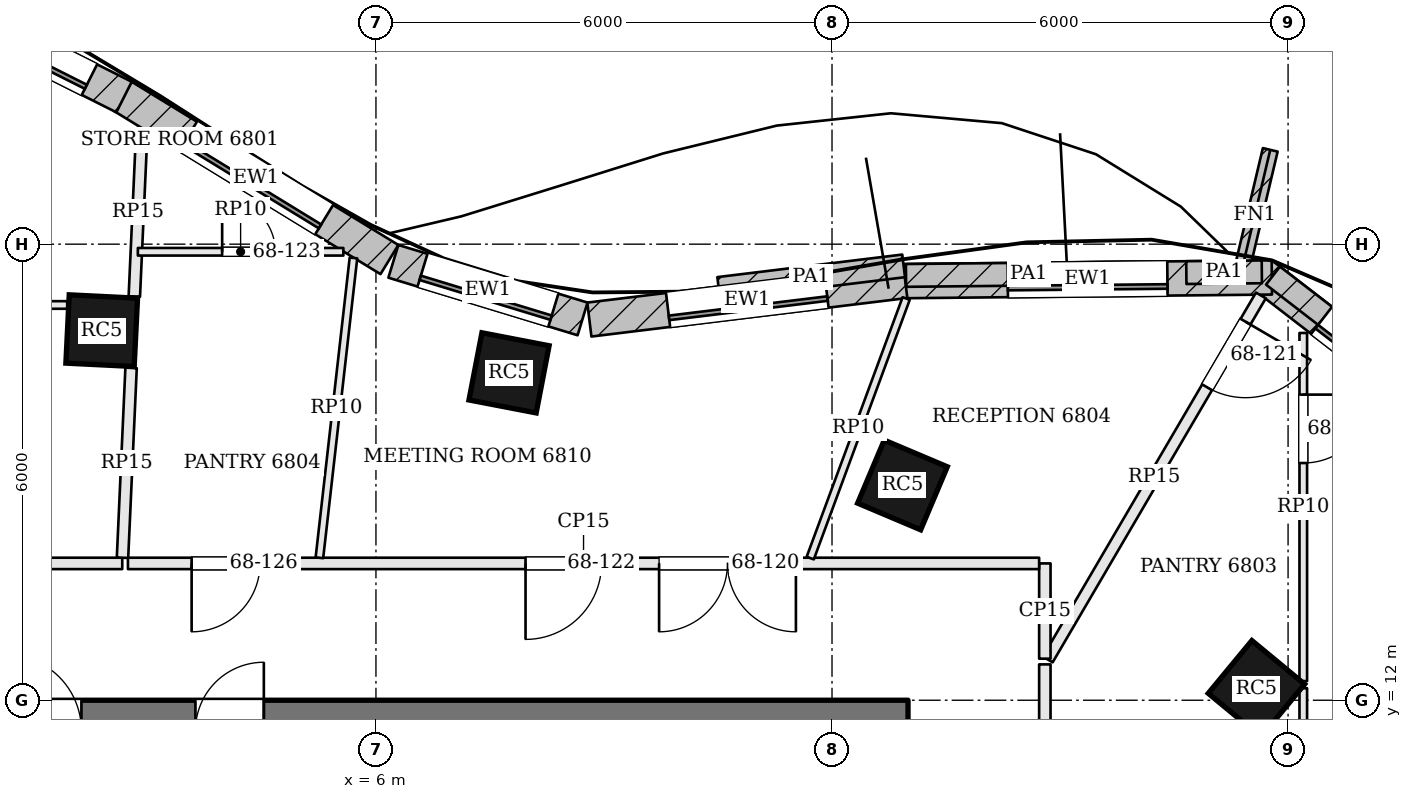
"""IFC4 building model, lengths in metres.
Left out: names, types, materials, properties, quantities, classifications, styles, units other than length and angle.
Written with IfcOpenShell. Run it as: python <this file> out.ifc"""

import sys

from ifc_helpers import new_model, si_unit, direction, frame, frame_2d, origin, origin_2d, place, context, subcontext, project, spatial, rectangle, extrude, element, fill, save


model = new_model("IFC4")
c1 = context("Model", 3, precision=1e-05, world=origin(), true_north=direction((0.0, 1.0)))
c2 = subcontext(c1, "Body", "Model", "MODEL_VIEW")
j1 = project(units=[si_unit("LENGTHUNIT", "METRE"), si_unit("PLANEANGLEUNIT", "RADIAN")], contexts=[c1])
p1 = place(None, origin())
s1 = spatial("IfcSite", under=j1, at=p1, CompositionType="ELEMENT")
p2 = place(p1, origin())
s2 = spatial("IfcBuilding", under=s1, at=p2, CompositionType="ELEMENT")
p3 = place(p2, frame((0.0, 0.0, 276.6)))
s3 = spatial("IfcBuildingStorey", under=s2, at=p3, CompositionType="ELEMENT", Elevation=276.6)
p4 = place(p3, frame((-13.0, 11.6, 0.0), z_axis=(0.0, 0.0, 1.0), x_axis=(1.0, 0.0, 0.0)))
e1 = element("IfcWall", 1, at=p4, inside=s3, PredefinedType="SHEAR", context=c2, shape_type="SweptSolid", body=[
    extrude(rectangle(XDim=26.0, YDim=0.8, at=frame_2d((13.0, 0.0))), origin(), (0.0, 0.0, 1.0), 3.9),
])
p5 = place(p4, frame((9.225, 0.0, 0.0)))
e2 = element("IfcOpeningElement", 2, at=p5, cuts=e1, PredefinedType="OPENING", context=c2, shape_type="SweptSolid", body=[
    extrude(rectangle(XDim=1.0, YDim=2.1, at=frame_2d((0.5, 1.05))), frame((0.0, 0.41, 0.0), z_axis=(0.0, -1.0, 0.0), x_axis=(1.0, 0.0, 0.0)), (0.0, 0.0, 1.0), 0.82),
])
p6 = place(p4, frame((11.825, 0.0, 0.0)))
e3 = element("IfcOpeningElement", 3, at=p6, cuts=e1, PredefinedType="OPENING", context=c2, shape_type="SweptSolid", body=[
    extrude(rectangle(XDim=0.7, YDim=2.1, at=frame_2d((0.35, 1.05))), frame((0.0, 0.41, 0.0), z_axis=(0.0, -1.0, 0.0), x_axis=(1.0, 0.0, 0.0)), (0.0, 0.0, 1.0), 0.82),
])
p7 = place(p4, frame((14.125, 0.0, 0.0)))
e4 = element("IfcOpeningElement", 4, at=p7, cuts=e1, PredefinedType="OPENING", context=c2, shape_type="SweptSolid", body=[
    extrude(rectangle(XDim=1.0, YDim=2.1, at=frame_2d((0.5, 1.05))), frame((0.0, 0.41, 0.0), z_axis=(0.0, -1.0, 0.0), x_axis=(1.0, 0.0, 0.0)), (0.0, 0.0, 1.0), 0.82),
])
p8 = place(p4, frame((16.625, 0.0, 0.0)))
e5 = element("IfcOpeningElement", 5, at=p8, cuts=e1, PredefinedType="OPENING", context=c2, shape_type="SweptSolid", body=[
    extrude(rectangle(XDim=0.9, YDim=2.1, at=frame_2d((0.45, 1.05))), frame((0.0, 0.41, 0.0), z_axis=(0.0, -1.0, 0.0), x_axis=(1.0, 0.0, 0.0)), (0.0, 0.0, 1.0), 0.82),
])
for number, where, z_axis, x_axis in (
    (6, (17.584, 12.151, 0.0), (0.0, 0.0, 1.0), (-0.771, 0.637, 0.0)),
    (7, (12.927, 14.832, 0.0), (0.0, 0.0, 1.0), (-0.921, 0.389, 0.0)),
    (8, (7.751, 16.307, 0.0), (0.0, 0.0, 1.0), (-0.982, 0.189, 0.0)),
    (9, (2.392, 16.862, 0.0), (0.0, 0.0, 1.0), (-0.999, 0.049, 0.0)),
):
    element("IfcColumn", number, at=place(p3, frame(where, z_axis=z_axis, x_axis=x_axis)), inside=s3, PredefinedType="COLUMN", context=c2, shape_type="SweptSolid", body=[
        extrude(rectangle(XDim=0.9, YDim=0.9, at=origin_2d()), origin(), (0.0, 0.0, 1.0), 3.9),
    ])
p9 = place(p3, frame((20.896, 15.104, 0.0), z_axis=(0.0, 0.0, 1.0), x_axis=(-0.791693388686, 0.610918634771, 0.0)))
e10 = element("IfcWall", 10, at=p9, inside=s3, PredefinedType="SOLIDWALL", context=c2, shape_type="SweptSolid", body=[
    extrude(rectangle(XDim=4.1, YDim=0.45, at=frame_2d((2.05, 0.0))), origin(), (0.0, 0.0, 1.0), 3.7),
])
p10 = place(p9, frame((1.0, 0.0, 0.9)))
e11 = element("IfcOpeningElement", 11, at=p10, cuts=e10, PredefinedType="OPENING", context=c2, shape_type="SweptSolid", body=[
    extrude(rectangle(XDim=2.1, YDim=2.3, at=frame_2d((1.05, 1.15))), frame((0.0, 0.235, 0.0), z_axis=(0.0, -1.0, 0.0), x_axis=(1.0, 0.0, 0.0)), (0.0, 0.0, 1.0), 0.47),
])
p11 = place(p3, frame((17.786, 17.562, 0.0), z_axis=(0.0, 0.0, 1.0), x_axis=(-0.999950280333, -0.00997180335, 0.0)))
e12 = element("IfcWall", 12, at=p11, inside=s3, PredefinedType="SOLIDWALL", context=c2, shape_type="SweptSolid", body=[
    extrude(rectangle(XDim=4.848, YDim=0.45, at=frame_2d((2.424, 0.0))), origin(), (0.0, 0.0, 1.0), 3.7),
])
p12 = place(p11, frame((1.374, 0.0, 0.9)))
e13 = element("IfcOpeningElement", 13, at=p12, cuts=e12, PredefinedType="OPENING", context=c2, shape_type="SweptSolid", body=[
    extrude(rectangle(XDim=2.1, YDim=2.3, at=frame_2d((1.05, 1.15))), frame((0.0, 0.235, 0.0), z_axis=(0.0, -1.0, 0.0), x_axis=(1.0, 0.0, 0.0)), (0.0, 0.0, 1.0), 0.47),
])
p13 = place(p3, frame((12.963, 17.515, 0.0), z_axis=(0.0, 0.0, 1.0), x_axis=(-0.992644852039, -0.121062784211, 0.0)))
e14 = element("IfcWall", 14, at=p13, inside=s3, PredefinedType="SOLIDWALL", context=c2, shape_type="SweptSolid", body=[
    extrude(rectangle(XDim=4.187, YDim=0.45, at=frame_2d((2.093, 0.0))), origin(), (0.0, 0.0, 1.0), 3.7),
])
p14 = place(p13, frame((1.043, 0.0, 0.9)))
e15 = element("IfcOpeningElement", 15, at=p14, cuts=e14, PredefinedType="OPENING", context=c2, shape_type="SweptSolid", body=[
    extrude(rectangle(XDim=2.1, YDim=2.3, at=frame_2d((1.05, 1.15))), frame((0.0, 0.235, 0.0), z_axis=(0.0, -1.0, 0.0), x_axis=(1.0, 0.0, 0.0)), (0.0, 0.0, 1.0), 0.47),
])
p15 = place(p3, frame((8.718, 17.017, 0.0), z_axis=(0.0, 0.0, 1.0), x_axis=(-0.956643192195, 0.291262429482, 0.0)))
e16 = element("IfcWall", 16, at=p15, inside=s3, PredefinedType="SOLIDWALL", context=c2, shape_type="SweptSolid", body=[
    extrude(rectangle(XDim=2.602, YDim=0.45, at=frame_2d((1.301, 0.0))), origin(), (0.0, 0.0, 1.0), 3.7),
])
p16 = place(p15, frame((0.401, 0.0, 0.9)))
e17 = element("IfcOpeningElement", 17, at=p16, cuts=e16, PredefinedType="OPENING", context=c2, shape_type="SweptSolid", body=[
    extrude(rectangle(XDim=1.8, YDim=2.3, at=frame_2d((0.9, 1.15))), frame((0.0, 0.235, 0.0), z_axis=(0.0, -1.0, 0.0), x_axis=(1.0, 0.0, 0.0)), (0.0, 0.0, 1.0), 0.47),
])
p17 = place(p3, frame((6.177, 17.798, 0.0), z_axis=(0.0, 0.0, 1.0), x_axis=(-0.852939764965, 0.52200934603, 0.0)))
e18 = element("IfcWall", 18, at=p17, inside=s3, PredefinedType="SOLIDWALL", context=c2, shape_type="SweptSolid", body=[
    extrude(rectangle(XDim=4.113, YDim=0.45, at=frame_2d((2.056, 0.0))), origin(), (0.0, 0.0, 1.0), 3.7),
])
p18 = place(p17, frame((1.006, 0.0, 0.9)))
e19 = element("IfcOpeningElement", 19, at=p18, cuts=e18, PredefinedType="OPENING", context=c2, shape_type="SweptSolid", body=[
    extrude(rectangle(XDim=2.1, YDim=2.3, at=frame_2d((1.05, 1.15))), frame((0.0, 0.235, 0.0), z_axis=(0.0, -1.0, 0.0), x_axis=(1.0, 0.0, 0.0)), (0.0, 0.0, 1.0), 0.47),
])
p19 = place(p3, frame((2.686, 19.936, 0.0), z_axis=(0.0, 0.0, 1.0), x_axis=(-0.893533051512, 0.448997422994, 0.0)))
e20 = element("IfcWall", 20, at=p19, inside=s3, PredefinedType="SOLIDWALL", context=c2, shape_type="SweptSolid", body=[
    extrude(rectangle(XDim=3.119, YDim=0.45, at=frame_2d((1.56, 0.0))), origin(), (0.0, 0.0, 1.0), 3.7),
])
p20 = place(p19, frame((0.51, 0.0, 0.9)))
e21 = element("IfcOpeningElement", 21, at=p20, cuts=e20, PredefinedType="OPENING", context=c2, shape_type="SweptSolid", body=[
    extrude(rectangle(XDim=2.1, YDim=2.3, at=frame_2d((1.05, 1.15))), frame((0.0, 0.235, 0.0), z_axis=(0.0, -1.0, 0.0), x_axis=(1.0, 0.0, 0.0)), (0.0, 0.0, 1.0), 0.47),
])
p21 = place(p3, frame((17.362, 17.538, 0.0), z_axis=(0.0, 0.0, 1.0), x_axis=(0.230469860183, 0.973079464148, 0.0)))
e22 = element("IfcWall", 22, at=p21, inside=s3, PredefinedType="SOLIDWALL", context=c2, shape_type="SweptSolid", body=[
    extrude(rectangle(XDim=1.75, YDim=0.2, at=frame_2d((0.875, 0.0))), origin(), (0.0, 0.0, 1.0), 3.7),
])
p22 = place(p3, frame((20.396, 15.584, 3.9), z_axis=(0.0, 0.0, 1.0), x_axis=(-0.791653544836, 0.610970265191, 0.0)))
e23 = element("IfcWall", 23, at=p22, inside=s3, PredefinedType="PARAPET", context=c2, shape_type="SweptSolid", body=[
    extrude(rectangle(XDim=3.277, YDim=0.3, at=frame_2d((1.638, 0.0))), origin(), (0.0, 0.0, 1.0), 1.1),
])
p23 = place(p3, frame((17.655, 17.636, 3.9), z_axis=(0.0, 0.0, 1.0), x_axis=(-0.999949189172, -0.010080628659, 0.0)))
e24 = element("IfcWall", 24, at=p23, inside=s3, PredefinedType="PARAPET", context=c2, shape_type="SweptSolid", body=[
    extrude(rectangle(XDim=0.993, YDim=0.3, at=frame_2d((0.497, 0.0))), origin(), (0.0, 0.0, 1.0), 1.1),
])
p24 = place(p3, frame((16.205, 17.621, 3.9), z_axis=(0.0, 0.0, 1.0), x_axis=(-0.999950267811, -0.009973058961, 0.0)))
e25 = element("IfcWall", 25, at=p24, inside=s3, PredefinedType="PARAPET", context=c2, shape_type="SweptSolid", body=[
    extrude(rectangle(XDim=3.231, YDim=0.3, at=frame_2d((1.616, 0.0))), origin(), (0.0, 0.0, 1.0), 1.1),
])
p25 = place(p3, frame((12.942, 17.714, 3.9), z_axis=(0.0, 0.0, 1.0), x_axis=(-0.992648796767, -0.121030435331, 0.0)))
e26 = element("IfcWall", 26, at=p25, inside=s3, PredefinedType="PARAPET", context=c2, shape_type="SweptSolid", body=[
    extrude(rectangle(XDim=2.451, YDim=0.3, at=frame_2d((1.226, 0.0))), origin(), (0.0, 0.0, 1.0), 1.1),
])
p26 = place(p3, frame((2.662, 13.8, 0.0), z_axis=(0.0, 0.0, 1.0), x_axis=(-1.0, 0.0, 0.0)))
e27 = element("IfcWall", 27, at=p26, inside=s3, PredefinedType="PARTITIONING", context=c2, shape_type="SweptSolid", body=[
    extrude(rectangle(XDim=17.462, YDim=0.15, at=frame_2d((8.731, 0.0))), origin(), (0.0, 0.0, 1.0), 3.198),
])
p27 = place(p26, frame((3.204, 0.0, 0.0)))
e28 = element("IfcOpeningElement", 28, at=p27, cuts=e27, PredefinedType="OPENING", context=c2, shape_type="SweptSolid", body=[
    extrude(rectangle(XDim=1.8, YDim=2.1, at=frame_2d((0.9, 1.05))), frame((0.0, 0.085, 0.0), z_axis=(0.0, -1.0, 0.0), x_axis=(1.0, 0.0, 0.0)), (0.0, 0.0, 1.0), 0.17),
])
p28 = place(p26, frame((8.997, 0.0, 0.0)))
e29 = element("IfcOpeningElement", 29, at=p28, cuts=e27, PredefinedType="OPENING", context=c2, shape_type="SweptSolid", body=[
    extrude(rectangle(XDim=1.0, YDim=2.4, at=frame_2d((0.5, 1.2))), frame((0.0, 0.085, 0.0), z_axis=(0.0, -1.0, 0.0), x_axis=(1.0, 0.0, 0.0)), (0.0, 0.0, 1.0), 0.17),
])
p29 = place(p26, frame((13.855, 0.0, 0.0)))
e30 = element("IfcOpeningElement", 30, at=p29, cuts=e27, PredefinedType="OPENING", context=c2, shape_type="SweptSolid", body=[
    extrude(rectangle(XDim=1.0, YDim=2.4, at=frame_2d((0.5, 1.2))), frame((0.0, 0.085, 0.0), z_axis=(0.0, -1.0, 0.0), x_axis=(1.0, 0.0, 0.0)), (0.0, 0.0, 1.0), 0.17),
])
p30 = place(p3, frame((2.921, 19.522, 0.0), z_axis=(0.0, 0.0, 1.0), x_axis=(-0.045122409645, -0.998981465368, 0.0)))
e31 = element("IfcWall", 31, at=p30, inside=s3, PredefinedType="PARTITIONING", context=c2, shape_type="SweptSolid", body=[
    extrude(rectangle(XDim=2.213, YDim=0.15, at=frame_2d((1.106, 0.0))), origin(), (0.0, 0.0, 1.0), 3.184),
])
p31 = place(p3, frame((2.779, 16.372, 0.0), z_axis=(0.0, 0.0, 1.0), x_axis=(-0.045217170266, -0.998977180677, 0.0)))
e32 = element("IfcWall", 32, at=p31, inside=s3, PredefinedType="PARTITIONING", context=c2, shape_type="SweptSolid", body=[
    extrude(rectangle(XDim=2.5, YDim=0.15, at=frame_2d((1.25, 0.0))), origin(), (0.0, 0.0, 1.0), 3.184),
])
p32 = place(p3, frame((14.8, -4.725, 0.0), z_axis=(0.0, 0.0, 1.0), x_axis=(0.0, 1.0, 0.0)))
e33 = element("IfcWall", 33, at=p32, inside=s3, PredefinedType="PARTITIONING", context=c2, shape_type="SweptSolid", body=[
    extrude(rectangle(XDim=17.197, YDim=0.15, at=frame_2d((8.598, 0.0))), origin(), (0.0, 0.0, 1.0), 3.198),
])
p33 = place(p32, frame((3.427, 0.0, 0.0)))
e34 = element("IfcOpeningElement", 34, at=p33, cuts=e33, PredefinedType="OPENING", context=c2, shape_type="SweptSolid", body=[
    extrude(rectangle(XDim=1.0, YDim=2.4, at=frame_2d((0.5, 1.2))), frame((0.0, 0.085, 0.0), z_axis=(0.0, -1.0, 0.0), x_axis=(1.0, 0.0, 0.0)), (0.0, 0.0, 1.0), 0.17),
])
p34 = place(p32, frame((9.431, 0.0, 0.0)))
e35 = element("IfcOpeningElement", 35, at=p34, cuts=e33, PredefinedType="OPENING", context=c2, shape_type="SweptSolid", body=[
    extrude(rectangle(XDim=1.0, YDim=2.4, at=frame_2d((0.5, 1.2))), frame((0.0, 0.085, 0.0), z_axis=(0.0, -1.0, 0.0), x_axis=(1.0, 0.0, 0.0)), (0.0, 0.0, 1.0), 0.17),
])
p35 = place(p3, frame((17.642, 17.325, 0.0), z_axis=(0.0, 0.0, 1.0), x_axis=(-0.505311858982, -0.862936802537, 0.0)))
e36 = element("IfcWall", 36, at=p35, inside=s3, PredefinedType="PARTITIONING", context=c2, shape_type="SweptSolid", body=[
    extrude(rectangle(XDim=5.55, YDim=0.15, at=frame_2d((2.775, 0.0))), origin(), (0.0, 0.0, 1.0), 3.184),
])
p36 = place(p35, frame((0.4, 0.0, 0.0)))
e37 = element("IfcOpeningElement", 37, at=p36, cuts=e36, PredefinedType="OPENING", context=c2, shape_type="SweptSolid", body=[
    extrude(rectangle(XDim=1.0, YDim=2.1, at=frame_2d((0.5, 1.05))), frame((0.0, 0.085, 0.0), z_axis=(0.0, -1.0, 0.0), x_axis=(1.0, 0.0, 0.0)), (0.0, 0.0, 1.0), 0.17),
])
p37 = place(p3, frame((14.8, 12.547, 0.0), z_axis=(0.0, 0.0, 1.0), x_axis=(0.0, 1.0, 0.0)))
e38 = element("IfcWall", 38, at=p37, inside=s3, PredefinedType="PARTITIONING", context=c2, shape_type="SweptSolid", body=[
    extrude(rectangle(XDim=1.253, YDim=0.15, at=frame_2d((0.627, 0.0))), origin(), (0.0, 0.0, 1.0), 3.198),
])
p38 = place(p3, frame((14.725, 13.8, 0.0), z_axis=(0.0, 0.0, 1.0), x_axis=(-1.0, 0.0, 0.0)))
e39 = element("IfcWall", 39, at=p38, inside=s3, PredefinedType="PARTITIONING", context=c2, shape_type="SweptSolid", body=[
    extrude(rectangle(XDim=11.988, YDim=0.15, at=frame_2d((5.994, 0.0))), origin(), (0.0, 0.0, 1.0), 3.198),
])
p39 = place(p38, frame((3.2, 0.0, 0.0)))
e40 = element("IfcOpeningElement", 40, at=p39, cuts=e39, PredefinedType="OPENING", context=c2, shape_type="SweptSolid", body=[
    extrude(rectangle(XDim=1.8, YDim=2.1, at=frame_2d((0.9, 1.05))), frame((0.0, 0.085, 0.0), z_axis=(0.0, -1.0, 0.0), x_axis=(1.0, 0.0, 0.0)), (0.0, 0.0, 1.0), 0.17),
])
p40 = place(p38, frame((5.757, 0.0, 0.0)))
e41 = element("IfcOpeningElement", 41, at=p40, cuts=e39, PredefinedType="OPENING", context=c2, shape_type="SweptSolid", body=[
    extrude(rectangle(XDim=1.0, YDim=2.4, at=frame_2d((0.5, 1.2))), frame((0.0, 0.085, 0.0), z_axis=(0.0, -1.0, 0.0), x_axis=(1.0, 0.0, 0.0)), (0.0, 0.0, 1.0), 0.17),
])
p41 = place(p38, frame((10.25, 0.0, 0.0)))
e42 = element("IfcOpeningElement", 42, at=p41, cuts=e39, PredefinedType="OPENING", context=c2, shape_type="SweptSolid", body=[
    extrude(rectangle(XDim=0.9, YDim=2.1, at=frame_2d((0.45, 1.05))), frame((0.0, 0.085, 0.0), z_axis=(0.0, -1.0, 0.0), x_axis=(1.0, 0.0, 0.0)), (0.0, 0.0, 1.0), 0.17),
])
p42 = place(p3, frame((-2.551, 17.2, 0.0), z_axis=(0.0, 0.0, 1.0), x_axis=(1.0, 0.0, 0.0)))
e43 = element("IfcWall", 43, at=p42, inside=s3, PredefinedType="PARTITIONING", context=c2, shape_type="SweptSolid", body=[
    extrude(rectangle(XDim=4.489, YDim=0.1, at=frame_2d((2.244, 0.0))), origin(), (0.0, 0.0, 1.0), 3.184),
])
p43 = place(p3, frame((18.2, 16.832, 0.0), z_axis=(0.0, 0.0, 1.0), x_axis=(0.0, -1.0, 0.0)))
e44 = element("IfcWall", 44, at=p43, inside=s3, PredefinedType="PARTITIONING", context=c2, shape_type="SweptSolid", body=[
    extrude(rectangle(XDim=4.58, YDim=0.1, at=frame_2d((2.29, 0.0))), origin(), (0.0, 0.0, 1.0), 3.184),
])
p44 = place(p43, frame((0.811, 0.0, 0.0)))
e45 = element("IfcOpeningElement", 45, at=p44, cuts=e44, PredefinedType="OPENING", context=c2, shape_type="SweptSolid", body=[
    extrude(rectangle(XDim=0.9, YDim=2.1, at=frame_2d((0.45, 1.05))), frame((0.0, 0.06, 0.0), z_axis=(0.0, -1.0, 0.0), x_axis=(1.0, 0.0, 0.0)), (0.0, 0.0, 1.0), 0.12),
])
p45 = place(p3, frame((18.2, 12.158, 0.0), z_axis=(0.0, 0.0, 1.0), x_axis=(0.0, -1.0, 0.0)))
e46 = element("IfcWall", 46, at=p45, inside=s3, PredefinedType="PARTITIONING", context=c2, shape_type="SweptSolid", body=[
    extrude(rectangle(XDim=20.358, YDim=0.1, at=frame_2d((10.179, 0.0))), origin(), (0.0, 0.0, 1.0), 3.184),
])
p46 = place(p3, frame((2.868, 17.9, 0.0), z_axis=(0.0, 0.0, 1.0), x_axis=(1.0, 0.0, 0.0)))
e47 = element("IfcWall", 47, at=p46, inside=s3, PredefinedType="PARTITIONING", context=c2, shape_type="SweptSolid", body=[
    extrude(rectangle(XDim=2.704, YDim=0.1, at=frame_2d((1.352, 0.0))), origin(), (0.0, 0.0, 1.0), 3.184),
])
p47 = place(p46, frame((1.109, 0.0, 0.0)))
e48 = element("IfcOpeningElement", 48, at=p47, cuts=e47, PredefinedType="OPENING", context=c2, shape_type="SweptSolid", body=[
    extrude(rectangle(XDim=0.7, YDim=2.1, at=frame_2d((0.35, 1.05))), frame((0.0, 0.06, 0.0), z_axis=(0.0, -1.0, 0.0), x_axis=(1.0, 0.0, 0.0)), (0.0, 0.0, 1.0), 0.12),
])
p48 = place(p3, frame((11.714, 13.87, 0.0), z_axis=(0.0, 0.0, 1.0), x_axis=(0.346665533997, 0.937988809922, 0.0)))
e49 = element("IfcWall", 49, at=p48, inside=s3, PredefinedType="PARTITIONING", context=c2, shape_type="SweptSolid", body=[
    extrude(rectangle(XDim=3.64, YDim=0.1, at=frame_2d((1.82, 0.0))), origin(), (0.0, 0.0, 1.0), 3.184),
])
p49 = place(p3, frame((5.256, 13.875, 0.0), z_axis=(0.0, 0.0, 1.0), x_axis=(0.11286138732, 0.993610742319, 0.0)))
e50 = element("IfcWall", 50, at=p49, inside=s3, PredefinedType="PARTITIONING", context=c2, shape_type="SweptSolid", body=[
    extrude(rectangle(XDim=3.969, YDim=0.1, at=frame_2d((1.985, 0.0))), origin(), (0.0, 0.0, 1.0), 3.184),
])
p50 = place(p10, origin())
e51 = element("IfcWindow", 51, at=p50, inside=s3, PartitioningType="SINGLE_PANEL", PredefinedType="WINDOW", context=c2, shape_type="SweptSolid", body=[
    extrude(rectangle(XDim=2.1, YDim=2.3, at=frame_2d((1.05, 1.15))), frame((0.0, 0.135, 0.0), z_axis=(0.0, -1.0, 0.0), x_axis=(1.0, 0.0, 0.0)), (0.0, 0.0, 1.0), 0.06),
])
fill(e11, e51)
p51 = place(p12, origin())
e52 = element("IfcWindow", 52, at=p51, inside=s3, PartitioningType="SINGLE_PANEL", PredefinedType="WINDOW", context=c2, shape_type="SweptSolid", body=[
    extrude(rectangle(XDim=2.1, YDim=2.3, at=frame_2d((1.05, 1.15))), frame((0.0, 0.135, 0.0), z_axis=(0.0, -1.0, 0.0), x_axis=(1.0, 0.0, 0.0)), (0.0, 0.0, 1.0), 0.06),
])
fill(e13, e52)
p52 = place(p14, origin())
e53 = element("IfcWindow", 53, at=p52, inside=s3, PartitioningType="SINGLE_PANEL", PredefinedType="WINDOW", context=c2, shape_type="SweptSolid", body=[
    extrude(rectangle(XDim=2.1, YDim=2.3, at=frame_2d((1.05, 1.15))), frame((0.0, 0.135, 0.0), z_axis=(0.0, -1.0, 0.0), x_axis=(1.0, 0.0, 0.0)), (0.0, 0.0, 1.0), 0.06),
])
fill(e15, e53)
p53 = place(p16, origin())
e54 = element("IfcWindow", 54, at=p53, inside=s3, PartitioningType="SINGLE_PANEL", PredefinedType="WINDOW", context=c2, shape_type="SweptSolid", body=[
    extrude(rectangle(XDim=1.8, YDim=2.3, at=frame_2d((0.9, 1.15))), frame((0.0, 0.135, 0.0), z_axis=(0.0, -1.0, 0.0), x_axis=(1.0, 0.0, 0.0)), (0.0, 0.0, 1.0), 0.06),
])
fill(e17, e54)
p54 = place(p18, origin())
e55 = element("IfcWindow", 55, at=p54, inside=s3, PartitioningType="SINGLE_PANEL", PredefinedType="WINDOW", context=c2, shape_type="SweptSolid", body=[
    extrude(rectangle(XDim=2.1, YDim=2.3, at=frame_2d((1.05, 1.15))), frame((0.0, 0.135, 0.0), z_axis=(0.0, -1.0, 0.0), x_axis=(1.0, 0.0, 0.0)), (0.0, 0.0, 1.0), 0.06),
])
fill(e19, e55)
p55 = place(p20, origin())
e56 = element("IfcWindow", 56, at=p55, inside=s3, PartitioningType="SINGLE_PANEL", PredefinedType="WINDOW", context=c2, shape_type="SweptSolid", body=[
    extrude(rectangle(XDim=2.1, YDim=2.3, at=frame_2d((1.05, 1.15))), frame((0.0, 0.135, 0.0), z_axis=(0.0, -1.0, 0.0), x_axis=(1.0, 0.0, 0.0)), (0.0, 0.0, 1.0), 0.06),
])
fill(e21, e56)
p56 = place(p44, origin())
e57 = element("IfcDoor", 57, at=p56, inside=s3, OperationType="SINGLE_SWING_LEFT", PredefinedType="DOOR", context=c2, shape_type="SweptSolid", body=[
    extrude(rectangle(XDim=0.9, YDim=2.1, at=frame_2d((0.45, 1.05))), frame((0.0, 0.025, 0.0), z_axis=(0.0, -1.0, 0.0), x_axis=(1.0, 0.0, 0.0)), (0.0, 0.0, 1.0), 0.05),
])
fill(e45, e57)
p57 = place(p39, origin())
e58 = element("IfcDoor", 58, at=p57, inside=s3, OperationType="DOUBLE_DOOR_SINGLE_SWING", PredefinedType="DOOR", context=c2, shape_type="SweptSolid", body=[
    extrude(rectangle(XDim=1.8, YDim=2.1, at=frame_2d((0.9, 1.05))), frame((0.0, 0.025, 0.0), z_axis=(0.0, -1.0, 0.0), x_axis=(1.0, 0.0, 0.0)), (0.0, 0.0, 1.0), 0.05),
])
fill(e40, e58)
p58 = place(p36, origin())
e59 = element("IfcDoor", 59, at=p58, inside=s3, OperationType="SINGLE_SWING_LEFT", PredefinedType="DOOR", context=c2, shape_type="SweptSolid", body=[
    extrude(rectangle(XDim=1.0, YDim=2.1, at=frame_2d((0.5, 1.05))), frame((0.0, 0.025, 0.0), z_axis=(0.0, -1.0, 0.0), x_axis=(1.0, 0.0, 0.0)), (0.0, 0.0, 1.0), 0.05),
])
fill(e37, e59)
p59 = place(p40, origin())
e60 = element("IfcDoor", 60, at=p59, inside=s3, OperationType="SINGLE_SWING_RIGHT", PredefinedType="DOOR", context=c2, shape_type="SweptSolid", body=[
    extrude(rectangle(XDim=1.0, YDim=2.4, at=frame_2d((0.5, 1.2))), frame((0.0, 0.025, 0.0), z_axis=(0.0, -1.0, 0.0), x_axis=(1.0, 0.0, 0.0)), (0.0, 0.0, 1.0), 0.05),
])
fill(e41, e60)
p60 = place(p47, origin())
e61 = element("IfcDoor", 61, at=p60, inside=s3, OperationType="SINGLE_SWING_LEFT", PredefinedType="DOOR", context=c2, shape_type="SweptSolid", body=[
    extrude(rectangle(XDim=0.7, YDim=2.1, at=frame_2d((0.35, 1.05))), frame((0.0, 0.025, 0.0), z_axis=(0.0, -1.0, 0.0), x_axis=(1.0, 0.0, 0.0)), (0.0, 0.0, 1.0), 0.05),
])
fill(e48, e61)
p61 = place(p41, origin())
e62 = element("IfcDoor", 62, at=p61, inside=s3, OperationType="SINGLE_SWING_RIGHT", PredefinedType="DOOR", context=c2, shape_type="SweptSolid", body=[
    extrude(rectangle(XDim=0.9, YDim=2.1, at=frame_2d((0.45, 1.05))), frame((0.0, 0.025, 0.0), z_axis=(0.0, -1.0, 0.0), x_axis=(1.0, 0.0, 0.0)), (0.0, 0.0, 1.0), 0.05),
])
fill(e42, e62)
save(model, sys.argv[1])
